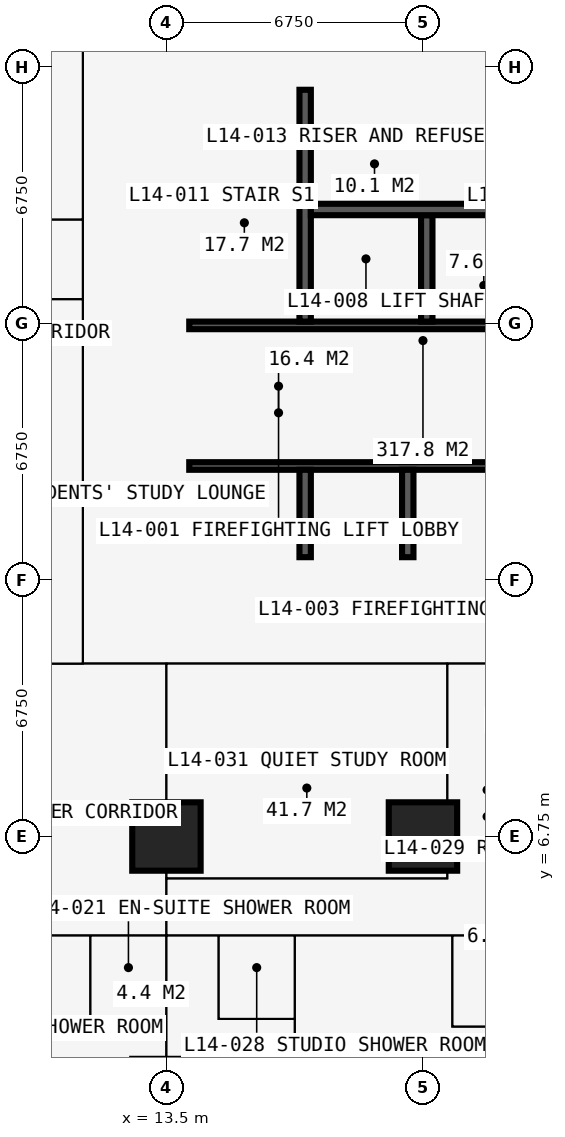
"""IFC4 building model, lengths in metres.
Left out: names, types, materials, properties, quantities, classifications, styles, units other than length and angle.
Written with IfcOpenShell. Run it as: python <this file> out.ifc"""

import sys

from ifc_helpers import new_model, si_unit, direction, frame, frame_2d, origin, origin_2d, place, context, subcontext, project, spatial, rectangle, extrude, element, fill, save


model = new_model("IFC4")
c1 = context("Model", 3, precision=1e-05, world=origin(), true_north=direction((0.0, 1.0)))
c2 = subcontext(c1, "Body", "Model", "MODEL_VIEW")
j1 = project(units=[si_unit("LENGTHUNIT", "METRE"), si_unit("PLANEANGLEUNIT", "RADIAN")], contexts=[c1])
p1 = place(None, origin())
s1 = spatial("IfcSite", under=j1, at=p1, CompositionType="ELEMENT")
p2 = place(p1, origin())
s2 = spatial("IfcBuilding", under=s1, at=p2, CompositionType="ELEMENT")
p3 = place(p2, frame((0.0, 0.0, 54.0)))
s3 = spatial("IfcBuildingStorey", under=s2, at=p3, CompositionType="ELEMENT", Elevation=54.0)
for number, where, z_axis, x_axis in (
    (1, (13.5, 6.75, 0.0), (0.0, 0.0, 1.0), (1.0, 0.0, 0.0)),
    (2, (20.25, 6.75, 0.0), (0.0, 0.0, 1.0), (1.0, 0.0, 0.0)),
):
    element("IfcColumn", number, at=place(p3, frame(where, z_axis=z_axis, x_axis=x_axis)), inside=s3, PredefinedType="COLUMN", context=c2, shape_type="SweptSolid", body=[
        extrude(rectangle(XDim=1.8, YDim=1.8, at=origin_2d()), origin(), (0.0, 0.0, 1.0), 3.6),
    ])
p4 = place(p3, frame((12.9, 13.5, 0.0), z_axis=(0.0, 0.0, 1.0), x_axis=(1.0, 0.0, 0.0)))
e3 = element("IfcWall", 3, at=p4, inside=s3, PredefinedType="SHEAR", context=c2, shape_type="SweptSolid", body=[
    extrude(rectangle(XDim=14.7, YDim=1.2, at=frame_2d((7.35, 0.0))), origin(), (0.0, 0.0, 1.0), 3.6),
])
p5 = place(p3, frame((27.6, 27.0, 0.0), z_axis=(0.0, 0.0, 1.0), x_axis=(-1.0, 0.0, 0.0)))
e4 = element("IfcWall", 4, at=p5, inside=s3, PredefinedType="SHEAR", context=c2, shape_type="SweptSolid", body=[
    extrude(rectangle(XDim=14.7, YDim=1.2, at=frame_2d((7.35, 0.0))), origin(), (0.0, 0.0, 1.0), 3.6),
])
p6 = place(p5, frame((4.55, 0.0, 0.0)))
e5 = element("IfcOpeningElement", 5, at=p6, cuts=e4, PredefinedType="OPENING", context=c2, shape_type="SweptSolid", body=[
    extrude(rectangle(XDim=0.9, YDim=2.2, at=frame_2d((0.45, 1.1))), frame((0.0, 0.61, 0.0), z_axis=(0.0, -1.0, 0.0), x_axis=(1.0, 0.0, 0.0)), (0.0, 0.0, 1.0), 1.22),
])
p7 = place(p5, frame((7.525, 0.0, 0.0)))
e6 = element("IfcOpeningElement", 6, at=p7, cuts=e4, PredefinedType="OPENING", context=c2, shape_type="SweptSolid", body=[
    extrude(rectangle(XDim=1.0, YDim=2.2, at=frame_2d((0.5, 1.1))), frame((0.0, 0.61, 0.0), z_axis=(0.0, -1.0, 0.0), x_axis=(1.0, 0.0, 0.0)), (0.0, 0.0, 1.0), 1.22),
])
p8 = place(p3, frame((13.5, 26.4, 0.0), z_axis=(0.0, 0.0, 1.0), x_axis=(0.0, -1.0, 0.0)))
e7 = element("IfcWall", 7, at=p8, inside=s3, PredefinedType="SHEAR", context=c2, shape_type="SweptSolid", body=[
    extrude(rectangle(XDim=12.3, YDim=1.2, at=frame_2d((6.15, 0.0))), origin(), (0.0, 0.0, 1.0), 3.6),
])
p9 = place(p8, frame((7.45, 0.0, 0.0)))
e8 = element("IfcOpeningElement", 8, at=p9, cuts=e7, PredefinedType="OPENING", context=c2, shape_type="SweptSolid", body=[
    extrude(rectangle(XDim=1.2, YDim=2.2, at=frame_2d((0.6, 1.1))), frame((0.0, 0.61, 0.0), z_axis=(0.0, -1.0, 0.0), x_axis=(1.0, 0.0, 0.0)), (0.0, 0.0, 1.0), 1.22),
])
p10 = place(p3, frame((14.1, 16.5, 0.0), z_axis=(0.0, 0.0, 1.0), x_axis=(1.0, 0.0, 0.0)))
e9 = element("IfcWall", 9, at=p10, inside=s3, PredefinedType="SHEAR", context=c2, shape_type="SweptSolid", body=[
    extrude(rectangle(XDim=12.3, YDim=0.2, at=frame_2d((6.15, 0.0))), origin(), (0.0, 0.0, 1.0), 3.6),
])
p11 = place(p10, frame((0.9, 0.0, 0.0)))
e10 = element("IfcOpeningElement", 10, at=p11, cuts=e9, PredefinedType="OPENING", context=c2, shape_type="SweptSolid", body=[
    extrude(rectangle(XDim=1.1, YDim=2.2, at=frame_2d((0.55, 1.1))), frame((0.0, 0.11, 0.0), z_axis=(0.0, -1.0, 0.0), x_axis=(1.0, 0.0, 0.0)), (0.0, 0.0, 1.0), 0.22),
])
p12 = place(p10, frame((9.5, 0.0, 0.0)))
e11 = element("IfcOpeningElement", 11, at=p12, cuts=e9, PredefinedType="OPENING", context=c2, shape_type="SweptSolid", body=[
    extrude(rectangle(XDim=1.1, YDim=2.2, at=frame_2d((0.55, 1.1))), frame((0.0, 0.11, 0.0), z_axis=(0.0, -1.0, 0.0), x_axis=(1.0, 0.0, 0.0)), (0.0, 0.0, 1.0), 0.22),
])
p13 = place(p3, frame((14.1, 20.2, 0.0), z_axis=(0.0, 0.0, 1.0), x_axis=(1.0, 0.0, 0.0)))
e12 = element("IfcWall", 12, at=p13, inside=s3, PredefinedType="SHEAR", context=c2, shape_type="SweptSolid", body=[
    extrude(rectangle(XDim=12.3, YDim=0.2, at=frame_2d((6.15, 0.0))), origin(), (0.0, 0.0, 1.0), 3.6),
])
p14 = place(p13, frame((0.35, 0.0, 0.0)))
e13 = element("IfcOpeningElement", 13, at=p14, cuts=e12, PredefinedType="OPENING", context=c2, shape_type="SweptSolid", body=[
    extrude(rectangle(XDim=1.1, YDim=2.2, at=frame_2d((0.55, 1.1))), frame((0.0, 0.11, 0.0), z_axis=(0.0, -1.0, 0.0), x_axis=(1.0, 0.0, 0.0)), (0.0, 0.0, 1.0), 0.22),
])
p15 = place(p13, frame((9.75, 0.0, 0.0)))
e14 = element("IfcOpeningElement", 14, at=p15, cuts=e12, PredefinedType="OPENING", context=c2, shape_type="SweptSolid", body=[
    extrude(rectangle(XDim=1.1, YDim=2.2, at=frame_2d((0.55, 1.1))), frame((0.0, 0.11, 0.0), z_axis=(0.0, -1.0, 0.0), x_axis=(1.0, 0.0, 0.0)), (0.0, 0.0, 1.0), 0.22),
])
p16 = place(p3, frame((17.15, 20.3, 0.0), z_axis=(0.0, 0.0, 1.0), x_axis=(0.0, 1.0, 0.0)))
e15 = element("IfcWall", 15, at=p16, inside=s3, PredefinedType="SHEAR", context=c2, shape_type="SweptSolid", body=[
    extrude(rectangle(XDim=6.1, YDim=0.3, at=frame_2d((3.05, 0.0))), origin(), (0.0, 0.0, 1.0), 3.6),
])
p17 = place(p3, frame((20.35, 20.3, 0.0), z_axis=(0.0, 0.0, 1.0), x_axis=(0.0, 1.0, 0.0)))
e16 = element("IfcWall", 16, at=p17, inside=s3, PredefinedType="SHEAR", context=c2, shape_type="SweptSolid", body=[
    extrude(rectangle(XDim=2.8, YDim=0.3, at=frame_2d((1.4, 0.0))), origin(), (0.0, 0.0, 1.0), 3.6),
])
p18 = place(p3, frame((17.3, 23.25, 0.0), z_axis=(0.0, 0.0, 1.0), x_axis=(1.0, 0.0, 0.0)))
e17 = element("IfcWall", 17, at=p18, inside=s3, PredefinedType="SHEAR", context=c2, shape_type="SweptSolid", body=[
    extrude(rectangle(XDim=5.9, YDim=0.3, at=frame_2d((2.95, 0.0))), origin(), (0.0, 0.0, 1.0), 3.6),
])
for number, where, z_axis, x_axis in (
    (18, (17.15, 14.1, 0.0), (0.0, 0.0, 1.0), (0.0, 1.0, 0.0)),
    (19, (19.85, 14.1, 0.0), (0.0, 0.0, 1.0), (0.0, 1.0, 0.0)),
):
    element("IfcWall", number, at=place(p3, frame(where, z_axis=z_axis, x_axis=x_axis)), inside=s3, PredefinedType="SHEAR", context=c2, shape_type="SweptSolid", body=[
        extrude(rectangle(XDim=2.3, YDim=0.3, at=frame_2d((1.15, 0.0))), origin(), (0.0, 0.0, 1.0), 3.6),
    ])
p19 = place(p3, frame((18.875, 16.6, 0.0), z_axis=(0.0, 0.0, 1.0), x_axis=(0.0, 1.0, 0.0)))
e20 = element("IfcWall", 20, at=p19, inside=s3, PredefinedType="PARTITIONING", context=c2, shape_type="SweptSolid", body=[
    extrude(rectangle(XDim=3.5, YDim=0.15, at=frame_2d((1.75, 0.0))), origin(), (0.0, 0.0, 1.0), 3.375),
])
p20 = place(p19, frame((1.15, 0.0, 0.0)))
e21 = element("IfcOpeningElement", 21, at=p20, cuts=e20, PredefinedType="OPENING", context=c2, shape_type="SweptSolid", body=[
    extrude(rectangle(XDim=1.2, YDim=2.2, at=frame_2d((0.6, 1.1))), frame((0.0, 0.085, 0.0), z_axis=(0.0, -1.0, 0.0), x_axis=(1.0, 0.0, 0.0)), (0.0, 0.0, 1.0), 0.17),
])
p21 = place(p3, frame((21.625, 16.6, 0.0), z_axis=(0.0, 0.0, 1.0), x_axis=(0.0, 1.0, 0.0)))
e22 = element("IfcWall", 22, at=p21, inside=s3, PredefinedType="PARTITIONING", context=c2, shape_type="SweptSolid", body=[
    extrude(rectangle(XDim=3.5, YDim=0.15, at=frame_2d((1.75, 0.0))), origin(), (0.0, 0.0, 1.0), 3.375),
])
p22 = place(p21, frame((1.15, 0.0, 0.0)))
e23 = element("IfcOpeningElement", 23, at=p22, cuts=e22, PredefinedType="OPENING", context=c2, shape_type="SweptSolid", body=[
    extrude(rectangle(XDim=1.2, YDim=2.2, at=frame_2d((0.6, 1.1))), frame((0.0, 0.085, 0.0), z_axis=(0.0, -1.0, 0.0), x_axis=(1.0, 0.0, 0.0)), (0.0, 0.0, 1.0), 0.17),
])
p23 = place(p3, frame((20.725, 23.4, 0.0), z_axis=(0.0, 0.0, 1.0), x_axis=(0.0, 1.0, 0.0)))
e24 = element("IfcWall", 24, at=p23, inside=s3, PredefinedType="PARTITIONING", context=c2, shape_type="SweptSolid", body=[
    extrude(rectangle(XDim=3.0, YDim=0.15, at=frame_2d((1.5, 0.0))), origin(), (0.0, 0.0, 1.0), 3.375),
])
for number, where, z_axis, x_axis in (
    (25, (5.65, 20.887, 0.0), (0.0, 0.0, 1.0), (1.0, 0.0, 0.0)),
    (26, (5.65, 22.988, 0.0), (0.0, 0.0, 1.0), (1.0, 0.0, 0.0)),
):
    element("IfcWall", number, at=place(p3, frame(where, z_axis=z_axis, x_axis=x_axis)), inside=s3, PredefinedType="PARTITIONING", context=c2, shape_type="SweptSolid", body=[
        extrude(rectangle(XDim=5.65, YDim=0.15, at=frame_2d((2.825, 0.0))), origin(), (0.0, 0.0, 1.0), 3.375),
    ])
p24 = place(p3, frame((6.75, 4.15, 0.0), z_axis=(0.0, 0.0, 1.0), x_axis=(1.0, 0.0, 0.0)))
e27 = element("IfcWall", 27, at=p24, inside=s3, PredefinedType="PARTITIONING", context=c2, shape_type="SweptSolid", body=[
    extrude(rectangle(XDim=23.625, YDim=0.15, at=frame_2d((11.812, 0.0))), origin(), (0.0, 0.0, 1.0), 3.375),
])
p25 = place(p24, frame((0.2, 0.0, 0.0)))
e28 = element("IfcOpeningElement", 28, at=p25, cuts=e27, PredefinedType="OPENING", context=c2, shape_type="SweptSolid", body=[
    extrude(rectangle(XDim=0.95, YDim=2.2, at=frame_2d((0.475, 1.1))), frame((0.0, 0.085, 0.0), z_axis=(0.0, -1.0, 0.0), x_axis=(1.0, 0.0, 0.0)), (0.0, 0.0, 1.0), 0.17),
])
p26 = place(p24, frame((3.625, 0.0, 0.0)))
e29 = element("IfcOpeningElement", 29, at=p26, cuts=e27, PredefinedType="OPENING", context=c2, shape_type="SweptSolid", body=[
    extrude(rectangle(XDim=0.95, YDim=2.2, at=frame_2d((0.475, 1.1))), frame((0.0, 0.085, 0.0), z_axis=(0.0, -1.0, 0.0), x_axis=(1.0, 0.0, 0.0)), (0.0, 0.0, 1.0), 0.17),
])
p27 = place(p24, frame((18.475, 0.0, 0.0)))
e30 = element("IfcOpeningElement", 30, at=p27, cuts=e27, PredefinedType="OPENING", context=c2, shape_type="SweptSolid", body=[
    extrude(rectangle(XDim=0.95, YDim=2.2, at=frame_2d((0.475, 1.1))), frame((0.0, 0.085, 0.0), z_axis=(0.0, -1.0, 0.0), x_axis=(1.0, 0.0, 0.0)), (0.0, 0.0, 1.0), 0.17),
])
p28 = place(p24, frame((11.725, 0.0, 0.0)))
e31 = element("IfcOpeningElement", 31, at=p28, cuts=e27, PredefinedType="OPENING", context=c2, shape_type="SweptSolid", body=[
    extrude(rectangle(XDim=0.95, YDim=2.2, at=frame_2d((0.475, 1.1))), frame((0.0, 0.085, 0.0), z_axis=(0.0, -1.0, 0.0), x_axis=(1.0, 0.0, 0.0)), (0.0, 0.0, 1.0), 0.17),
])
p29 = place(p24, frame((6.95, 0.0, 0.0)))
e32 = element("IfcOpeningElement", 32, at=p29, cuts=e27, PredefinedType="OPENING", context=c2, shape_type="SweptSolid", body=[
    extrude(rectangle(XDim=0.95, YDim=2.2, at=frame_2d((0.475, 1.1))), frame((0.0, 0.085, 0.0), z_axis=(0.0, -1.0, 0.0), x_axis=(1.0, 0.0, 0.0)), (0.0, 0.0, 1.0), 0.17),
])
p30 = place(p3, frame((10.125, 11.3, 0.0), z_axis=(0.0, 0.0, 1.0), x_axis=(1.0, 0.0, 0.0)))
e33 = element("IfcWall", 33, at=p30, inside=s3, PredefinedType="PARTITIONING", context=c2, shape_type="SweptSolid", body=[
    extrude(rectangle(XDim=20.675, YDim=0.15, at=frame_2d((10.337, 0.0))), origin(), (0.0, 0.0, 1.0), 3.375),
])
p31 = place(p30, frame((1.775, 0.0, 0.0)))
e34 = element("IfcOpeningElement", 34, at=p31, cuts=e33, PredefinedType="OPENING", context=c2, shape_type="SweptSolid", body=[
    extrude(rectangle(XDim=1.0, YDim=2.2, at=frame_2d((0.5, 1.1))), frame((0.0, 0.085, 0.0), z_axis=(0.0, -1.0, 0.0), x_axis=(1.0, 0.0, 0.0)), (0.0, 0.0, 1.0), 0.17),
])
p32 = place(p30, frame((11.312, 0.0, 0.0)))
e35 = element("IfcOpeningElement", 35, at=p32, cuts=e33, PredefinedType="OPENING", context=c2, shape_type="SweptSolid", body=[
    extrude(rectangle(XDim=1.0, YDim=2.2, at=frame_2d((0.5, 1.1))), frame((0.0, 0.085, 0.0), z_axis=(0.0, -1.0, 0.0), x_axis=(1.0, 0.0, 0.0)), (0.0, 0.0, 1.0), 0.17),
])
p33 = place(p3, frame((11.3, 11.3, 0.0), z_axis=(0.0, 0.0, 1.0), x_axis=(0.0, 1.0, 0.0)))
e36 = element("IfcWall", 36, at=p33, inside=s3, PredefinedType="PARTITIONING", context=c2, shape_type="SweptSolid", body=[
    extrude(rectangle(XDim=19.075, YDim=0.15, at=frame_2d((9.538, 0.0))), origin(), (0.0, 0.0, 1.0), 3.375),
])
p34 = place(p33, frame((10.137, 0.0, 0.0)))
e37 = element("IfcOpeningElement", 37, at=p34, cuts=e36, PredefinedType="OPENING", context=c2, shape_type="SweptSolid", body=[
    extrude(rectangle(XDim=1.0, YDim=2.2, at=frame_2d((0.5, 1.1))), frame((0.0, 0.085, 0.0), z_axis=(0.0, -1.0, 0.0), x_axis=(1.0, 0.0, 0.0)), (0.0, 0.0, 1.0), 0.17),
])
p35 = place(p3, frame((11.5, 1.95, 0.0), z_axis=(0.0, 0.0, 1.0), x_axis=(0.0, 1.0, 0.0)))
e38 = element("IfcWall", 38, at=p35, inside=s3, PredefinedType="PARTITIONING", context=c2, shape_type="SweptSolid", body=[
    extrude(rectangle(XDim=2.2, YDim=0.1, at=frame_2d((1.1, 0.0))), origin(), (0.0, 0.0, 1.0), 3.375),
])
p36 = place(p35, frame((0.65, 0.0, 0.0)))
e39 = element("IfcOpeningElement", 39, at=p36, cuts=e38, PredefinedType="OPENING", context=c2, shape_type="SweptSolid", body=[
    extrude(rectangle(XDim=0.9, YDim=2.2, at=frame_2d((0.45, 1.1))), frame((0.0, 0.06, 0.0), z_axis=(0.0, -1.0, 0.0), x_axis=(1.0, 0.0, 0.0)), (0.0, 0.0, 1.0), 0.12),
])
p37 = place(p3, frame((11.5, 1.95, 0.0), z_axis=(0.0, 0.0, 1.0), x_axis=(1.0, 0.0, 0.0)))
e40 = element("IfcWall", 40, at=p37, inside=s3, PredefinedType="PARTITIONING", context=c2, shape_type="SweptSolid", body=[
    extrude(rectangle(XDim=2.0, YDim=0.1, at=frame_2d((1.0, 0.0))), origin(), (0.0, 0.0, 1.0), 3.375),
])
p38 = place(p3, frame((13.5, -0.734, 0.0), z_axis=(0.0, 0.0, 1.0), x_axis=(0.0, 1.0, 0.0)))
e41 = element("IfcWall", 41, at=p38, inside=s3, PredefinedType="PARTITIONING", context=c2, shape_type="SweptSolid", body=[
    extrude(rectangle(XDim=12.034, YDim=0.15, at=frame_2d((6.017, 0.0))), origin(), (0.0, 0.0, 1.0), 2.877),
])
p39 = place(p3, frame((13.5, 5.65, 0.0), z_axis=(0.0, 0.0, 1.0), x_axis=(1.0, 0.0, 0.0)))
e42 = element("IfcWall", 42, at=p39, inside=s3, PredefinedType="PARTITIONING", context=c2, shape_type="SweptSolid", body=[
    extrude(rectangle(XDim=7.387, YDim=0.15, at=frame_2d((3.694, 0.0))), origin(), (0.0, 0.0, 1.0), 3.375),
])
p40 = place(p39, frame((3.2, 0.0, 0.0)))
e43 = element("IfcOpeningElement", 43, at=p40, cuts=e42, PredefinedType="OPENING", context=c2, shape_type="SweptSolid", body=[
    extrude(rectangle(XDim=0.95, YDim=2.2, at=frame_2d((0.475, 1.1))), frame((0.0, 0.085, 0.0), z_axis=(0.0, -1.0, 0.0), x_axis=(1.0, 0.0, 0.0)), (0.0, 0.0, 1.0), 0.17),
])
p41 = place(p3, frame((14.875, 1.95, 0.0), z_axis=(0.0, 0.0, 1.0), x_axis=(0.0, 1.0, 0.0)))
e44 = element("IfcWall", 44, at=p41, inside=s3, PredefinedType="PARTITIONING", context=c2, shape_type="SweptSolid", body=[
    extrude(rectangle(XDim=2.2, YDim=0.1, at=frame_2d((1.1, 0.0))), origin(), (0.0, 0.0, 1.0), 3.375),
])
p42 = place(p3, frame((14.875, 1.95, 0.0), z_axis=(0.0, 0.0, 1.0), x_axis=(1.0, 0.0, 0.0)))
e45 = element("IfcWall", 45, at=p42, inside=s3, PredefinedType="PARTITIONING", context=c2, shape_type="SweptSolid", body=[
    extrude(rectangle(XDim=2.0, YDim=0.1, at=frame_2d((1.0, 0.0))), origin(), (0.0, 0.0, 1.0), 3.375),
])
p43 = place(p3, frame((16.875, -0.734, 0.0), z_axis=(0.0, 0.0, 1.0), x_axis=(0.0, 1.0, 0.0)))
e46 = element("IfcWall", 46, at=p43, inside=s3, PredefinedType="PARTITIONING", context=c2, shape_type="SweptSolid", body=[
    extrude(rectangle(XDim=4.884, YDim=0.175, at=frame_2d((2.442, 0.0))), origin(), (0.0, 0.0, 1.0), 3.375),
])
p44 = place(p43, frame((3.334, 0.0, 0.0)))
e47 = element("IfcOpeningElement", 47, at=p44, cuts=e46, PredefinedType="OPENING", context=c2, shape_type="SweptSolid", body=[
    extrude(rectangle(XDim=0.9, YDim=2.2, at=frame_2d((0.45, 1.1))), frame((0.0, 0.097, 0.0), z_axis=(0.0, -1.0, 0.0), x_axis=(1.0, 0.0, 0.0)), (0.0, 0.0, 1.0), 0.195),
])
p45 = place(p3, frame((20.887, 5.65, 0.0), z_axis=(0.0, 0.0, 1.0), x_axis=(0.0, 1.0, 0.0)))
e48 = element("IfcWall", 48, at=p45, inside=s3, PredefinedType="PARTITIONING", context=c2, shape_type="SweptSolid", body=[
    extrude(rectangle(XDim=5.65, YDim=0.15, at=frame_2d((2.825, 0.0))), origin(), (0.0, 0.0, 1.0), 3.375),
])
p46 = place(p3, frame((21.025, 1.75, 0.0), z_axis=(0.0, 0.0, 1.0), x_axis=(0.0, 1.0, 0.0)))
e49 = element("IfcWall", 49, at=p46, inside=s3, PredefinedType="PARTITIONING", context=c2, shape_type="SweptSolid", body=[
    extrude(rectangle(XDim=2.4, YDim=0.1, at=frame_2d((1.2, 0.0))), origin(), (0.0, 0.0, 1.0), 3.375),
])
p47 = place(p3, frame((21.025, 1.75, 0.0), z_axis=(0.0, 0.0, 1.0), x_axis=(1.0, 0.0, 0.0)))
e50 = element("IfcWall", 50, at=p47, inside=s3, PredefinedType="PARTITIONING", context=c2, shape_type="SweptSolid", body=[
    extrude(rectangle(XDim=2.6, YDim=0.1, at=frame_2d((1.3, 0.0))), origin(), (0.0, 0.0, 1.0), 3.375),
])
p48 = place(p11, origin())
e51 = element("IfcDoor", 51, at=p48, inside=s3, OperationType="DOUBLE_DOOR_SLIDING", PredefinedType="DOOR", context=c2, shape_type="SweptSolid", body=[
    extrude(rectangle(XDim=1.1, YDim=2.2, at=frame_2d((0.55, 1.1))), frame((0.0, 0.025, 0.0), z_axis=(0.0, -1.0, 0.0), x_axis=(1.0, 0.0, 0.0)), (0.0, 0.0, 1.0), 0.05),
])
fill(e10, e51)
p49 = place(p9, origin())
e52 = element("IfcDoor", 52, at=p49, inside=s3, OperationType="DOUBLE_DOOR_SINGLE_SWING", PredefinedType="DOOR", context=c2, shape_type="SweptSolid", body=[
    extrude(rectangle(XDim=1.2, YDim=2.2, at=frame_2d((0.6, 1.1))), frame((0.0, 0.025, 0.0), z_axis=(0.0, -1.0, 0.0), x_axis=(1.0, 0.0, 0.0)), (0.0, 0.0, 1.0), 0.05),
])
fill(e8, e52)
p50 = place(p20, origin())
e53 = element("IfcDoor", 53, at=p50, inside=s3, OperationType="DOUBLE_DOOR_SINGLE_SWING", PredefinedType="DOOR", context=c2, shape_type="SweptSolid", body=[
    extrude(rectangle(XDim=1.2, YDim=2.2, at=frame_2d((0.6, 1.1))), frame((0.0, 0.025, 0.0), z_axis=(0.0, -1.0, 0.0), x_axis=(1.0, 0.0, 0.0)), (0.0, 0.0, 1.0), 0.05),
])
fill(e21, e53)
p51 = place(p22, origin())
e54 = element("IfcDoor", 54, at=p51, inside=s3, OperationType="DOUBLE_DOOR_SINGLE_SWING", PredefinedType="DOOR", context=c2, shape_type="SweptSolid", body=[
    extrude(rectangle(XDim=1.2, YDim=2.2, at=frame_2d((0.6, 1.1))), frame((0.0, 0.025, 0.0), z_axis=(0.0, -1.0, 0.0), x_axis=(1.0, 0.0, 0.0)), (0.0, 0.0, 1.0), 0.05),
])
fill(e23, e54)
p52 = place(p7, origin())
e55 = element("IfcDoor", 55, at=p52, inside=s3, OperationType="SINGLE_SWING_LEFT", PredefinedType="DOOR", context=c2, shape_type="SweptSolid", body=[
    extrude(rectangle(XDim=1.0, YDim=2.2, at=frame_2d((0.5, 1.1))), frame((0.0, 0.025, 0.0), z_axis=(0.0, -1.0, 0.0), x_axis=(1.0, 0.0, 0.0)), (0.0, 0.0, 1.0), 0.05),
])
fill(e6, e55)
p53 = place(p14, origin())
e56 = element("IfcDoor", 56, at=p53, inside=s3, OperationType="SINGLE_SWING_LEFT", PredefinedType="DOOR", context=c2, shape_type="SweptSolid", body=[
    extrude(rectangle(XDim=1.1, YDim=2.2, at=frame_2d((0.55, 1.1))), frame((0.0, 0.025, 0.0), z_axis=(0.0, -1.0, 0.0), x_axis=(1.0, 0.0, 0.0)), (0.0, 0.0, 1.0), 0.05),
])
fill(e13, e56)
p54 = place(p26, origin())
e57 = element("IfcDoor", 57, at=p54, inside=s3, OperationType="SINGLE_SWING_LEFT", PredefinedType="DOOR", context=c2, shape_type="SweptSolid", body=[
    extrude(rectangle(XDim=0.95, YDim=2.2, at=frame_2d((0.475, 1.1))), frame((0.0, 0.025, 0.0), z_axis=(0.0, -1.0, 0.0), x_axis=(1.0, 0.0, 0.0)), (0.0, 0.0, 1.0), 0.05),
])
fill(e29, e57)
p55 = place(p36, origin())
e58 = element("IfcDoor", 58, at=p55, inside=s3, OperationType="SINGLE_SWING_RIGHT", PredefinedType="DOOR", context=c2, shape_type="SweptSolid", body=[
    extrude(rectangle(XDim=0.9, YDim=2.2, at=frame_2d((0.45, 1.1))), frame((0.0, 0.025, 0.0), z_axis=(0.0, -1.0, 0.0), x_axis=(1.0, 0.0, 0.0)), (0.0, 0.0, 1.0), 0.05),
])
fill(e39, e58)
p56 = place(p31, origin())
e59 = element("IfcDoor", 59, at=p56, inside=s3, OperationType="SINGLE_SWING_LEFT", PredefinedType="DOOR", context=c2, shape_type="SweptSolid", body=[
    extrude(rectangle(XDim=1.0, YDim=2.2, at=frame_2d((0.5, 1.1))), frame((0.0, 0.025, 0.0), z_axis=(0.0, -1.0, 0.0), x_axis=(1.0, 0.0, 0.0)), (0.0, 0.0, 1.0), 0.05),
])
fill(e34, e59)
p57 = place(p28, origin())
e60 = element("IfcDoor", 60, at=p57, inside=s3, OperationType="SINGLE_SWING_LEFT", PredefinedType="DOOR", context=c2, shape_type="SweptSolid", body=[
    extrude(rectangle(XDim=0.95, YDim=2.2, at=frame_2d((0.475, 1.1))), frame((0.0, 0.025, 0.0), z_axis=(0.0, -1.0, 0.0), x_axis=(1.0, 0.0, 0.0)), (0.0, 0.0, 1.0), 0.05),
])
fill(e31, e60)
p58 = place(p29, origin())
e61 = element("IfcDoor", 61, at=p58, inside=s3, OperationType="SINGLE_SWING_LEFT", PredefinedType="DOOR", context=c2, shape_type="SweptSolid", body=[
    extrude(rectangle(XDim=0.95, YDim=2.2, at=frame_2d((0.475, 1.1))), frame((0.0, 0.025, 0.0), z_axis=(0.0, -1.0, 0.0), x_axis=(1.0, 0.0, 0.0)), (0.0, 0.0, 1.0), 0.05),
])
fill(e32, e61)
p59 = place(p44, origin())
e62 = element("IfcDoor", 62, at=p59, inside=s3, OperationType="SINGLE_SWING_RIGHT", PredefinedType="DOOR", context=c2, shape_type="SweptSolid", body=[
    extrude(rectangle(XDim=0.9, YDim=2.2, at=frame_2d((0.45, 1.1))), frame((0.0, 0.025, 0.0), z_axis=(0.0, -1.0, 0.0), x_axis=(1.0, 0.0, 0.0)), (0.0, 0.0, 1.0), 0.05),
])
fill(e47, e62)
p60 = place(p32, origin())
e63 = element("IfcDoor", 63, at=p60, inside=s3, OperationType="SINGLE_SWING_LEFT", PredefinedType="DOOR", context=c2, shape_type="SweptSolid", body=[
    extrude(rectangle(XDim=1.0, YDim=2.2, at=frame_2d((0.5, 1.1))), frame((0.0, 0.025, 0.0), z_axis=(0.0, -1.0, 0.0), x_axis=(1.0, 0.0, 0.0)), (0.0, 0.0, 1.0), 0.05),
])
fill(e35, e63)
p61 = place(p40, origin())
e64 = element("IfcDoor", 64, at=p61, inside=s3, OperationType="SINGLE_SWING_LEFT", PredefinedType="DOOR", context=c2, shape_type="SweptSolid", body=[
    extrude(rectangle(XDim=0.95, YDim=2.2, at=frame_2d((0.475, 1.1))), frame((0.0, 0.025, 0.0), z_axis=(0.0, -1.0, 0.0), x_axis=(1.0, 0.0, 0.0)), (0.0, 0.0, 1.0), 0.05),
])
fill(e43, e64)
p62 = place(p34, origin())
e65 = element("IfcDoor", 65, at=p62, inside=s3, OperationType="SINGLE_SWING_LEFT", PredefinedType="DOOR", context=c2, shape_type="SweptSolid", body=[
    extrude(rectangle(XDim=1.0, YDim=2.2, at=frame_2d((0.5, 1.1))), frame((0.0, 0.025, 0.0), z_axis=(0.0, -1.0, 0.0), x_axis=(1.0, 0.0, 0.0)), (0.0, 0.0, 1.0), 0.05),
])
fill(e37, e65)
save(model, sys.argv[1])
